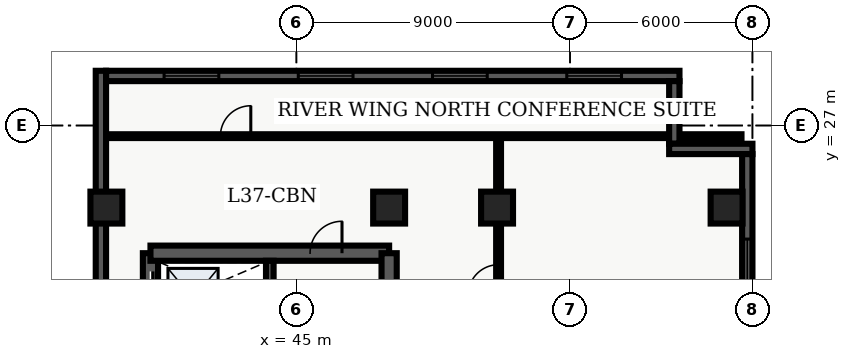
"""IFC4 building model, lengths in metres.
Left out: names, types, materials, properties, quantities, classifications, styles, units other than length and angle.
Written with IfcOpenShell. Run it as: python <this file> out.ifc"""

import sys

from ifc_helpers import new_model, entity, si_unit, converted_unit, direction, frame, origin_with_axes, origin_2d_with_axis, place, context, subcontext, project, spatial, polyline, rectangle, outline, extrude, element, fill, save


model = new_model("IFC4")
c1 = context("Model", 3, precision=1e-05, world=origin_with_axes(), true_north=direction((0.0, 1.0)))
c2 = subcontext(c1, "Body", "Model", "MODEL_VIEW")
j1 = project(units=[si_unit("LENGTHUNIT", "METRE"), converted_unit("PLANEANGLEUNIT", "DEGREE", entity("IfcPlaneAngleMeasure", 0.017), si_unit("PLANEANGLEUNIT", "RADIAN"), dimensions=[0, 0, 0, 0, 0, 0, 0])], contexts=[c1])
p1 = place(None, origin_with_axes())
s1 = spatial("IfcSite", under=j1, at=p1, CompositionType="ELEMENT")
p2 = place(p1, origin_with_axes())
s2 = spatial("IfcBuilding", under=s1, at=p2, CompositionType="ELEMENT")
p3 = place(p2, frame((0.0, 0.0, 152.4), z_axis=(0.0, 0.0, 1.0), x_axis=(1.0, 0.0, 0.0)))
s3 = spatial("IfcBuildingStorey", under=s2, at=p3, CompositionType="ELEMENT", Elevation=152.4)
p4 = place(p3, frame((40.2, 7.2, 0.0), z_axis=(0.0, 0.0, 1.0), x_axis=(0.0, 1.0, 0.0)))
e1 = element("IfcWall", 1, at=p4, inside=s3, PredefinedType="SHEAR", context=c2, shape_type="SweptSolid", body=[
    extrude(outline(polyline([(0.0, -0.25), (15.6, -0.25), (15.6, 0.25), (0.0, 0.25), (0.0, -0.25)])), origin_with_axes(), (0.0, 0.0, 1.0), 3.66),
])
p5 = place(p4, frame((14.475, 0.0, 0.0), z_axis=(0.0, 0.0, 1.0), x_axis=(1.0, 0.0, 0.0)))
e2 = element("IfcOpeningElement", 2, at=p5, cuts=e1, PredefinedType="OPENING", context=c2, shape_type="SweptSolid", body=[
    extrude(rectangle(XDim=1.05, YDim=0.52, at=origin_2d_with_axis()), origin_with_axes(), (0.0, 0.0, 1.0), 2.15),
])
p6 = place(p4, frame((12.75, 0.0, 0.0), z_axis=(0.0, 0.0, 1.0), x_axis=(1.0, 0.0, 0.0)))
e3 = element("IfcOpeningElement", 3, at=p6, cuts=e1, PredefinedType="OPENING", context=c2, shape_type="SweptSolid", body=[
    extrude(rectangle(XDim=1.2, YDim=0.52, at=origin_2d_with_axis()), origin_with_axes(), (0.0, 0.0, 1.0), 2.15),
])
p7 = place(p4, frame((9.3, 0.0, 0.0), z_axis=(0.0, 0.0, 1.0), x_axis=(1.0, 0.0, 0.0)))
e4 = element("IfcOpeningElement", 4, at=p7, cuts=e1, PredefinedType="OPENING", context=c2, shape_type="SweptSolid", body=[
    extrude(rectangle(XDim=0.9, YDim=0.52, at=origin_2d_with_axis()), origin_with_axes(), (0.0, 0.0, 1.0), 2.15),
])
p8 = place(p3, frame((40.2, 22.8, 0.0), z_axis=(0.0, 0.0, 1.0), x_axis=(1.0, 0.0, 0.0)))
e5 = element("IfcWall", 5, at=p8, inside=s3, PredefinedType="SHEAR", context=c2, shape_type="SweptSolid", body=[
    extrude(outline(polyline([(0.0, -0.25), (7.85, -0.25), (7.85, 0.25), (0.0, 0.25), (0.0, -0.25)])), origin_with_axes(), (0.0, 0.0, 1.0), 3.66),
])
p9 = place(p8, frame((5.775, 0.0, 0.0), z_axis=(0.0, 0.0, 1.0), x_axis=(1.0, 0.0, 0.0)))
e6 = element("IfcOpeningElement", 6, at=p9, cuts=e5, PredefinedType="OPENING", context=c2, shape_type="SweptSolid", body=[
    extrude(rectangle(XDim=1.05, YDim=0.52, at=origin_2d_with_axis()), origin_with_axes(), (0.0, 0.0, 1.0), 2.15),
])
p10 = place(p3, frame((48.05, 7.2, 0.0), z_axis=(0.0, 0.0, 1.0), x_axis=(0.0, 1.0, 0.0)))
e7 = element("IfcWall", 7, at=p10, inside=s3, PredefinedType="SHEAR", context=c2, shape_type="SweptSolid", body=[
    extrude(outline(polyline([(0.0, -0.25), (15.6, -0.25), (15.6, 0.25), (0.0, 0.25), (0.0, -0.25)])), origin_with_axes(), (0.0, 0.0, 1.0), 3.66),
])
p11 = place(p10, frame((5.975, 0.0, 0.0), z_axis=(0.0, 0.0, 1.0), x_axis=(1.0, 0.0, 0.0)))
e8 = element("IfcOpeningElement", 8, at=p11, cuts=e7, PredefinedType="OPENING", context=c2, shape_type="SweptSolid", body=[
    extrude(rectangle(XDim=1.05, YDim=0.52, at=origin_2d_with_axis()), origin_with_axes(), (0.0, 0.0, 1.0), 2.15),
])
p12 = place(p10, frame((2.725, 0.0, 0.0), z_axis=(0.0, 0.0, 1.0), x_axis=(1.0, 0.0, 0.0)))
e9 = element("IfcOpeningElement", 9, at=p12, cuts=e7, PredefinedType="OPENING", context=c2, shape_type="SweptSolid", body=[
    extrude(rectangle(XDim=0.95, YDim=0.52, at=origin_2d_with_axis()), origin_with_axes(), (0.0, 0.0, 1.0), 2.15),
])
p13 = place(p3, frame((44.125, 7.45, 0.0), z_axis=(0.0, 0.0, 1.0), x_axis=(0.0, 1.0, 0.0)))
e10 = element("IfcWall", 10, at=p13, inside=s3, PredefinedType="SHEAR", context=c2, shape_type="SweptSolid", body=[
    extrude(outline(polyline([(0.0, -0.125), (15.1, -0.125), (15.1, 0.125), (0.0, 0.125), (0.0, -0.125)])), origin_with_axes(), (0.0, 0.0, 1.0), 3.66),
])
for number, where, z_axis, x_axis in (
    (11, (38.75, 24.3, 0.0), (0.0, 0.0, 1.0), (1.0, 0.0, 0.0)),
    (12, (48.05, 24.3, 0.0), (0.0, 0.0, 1.0), (1.0, 0.0, 0.0)),
    (13, (51.6, 24.3, 0.0), (0.0, 0.0, 1.0), (1.0, 0.0, 0.0)),
    (14, (59.15, 24.3, 0.0), (0.0, 0.0, 1.0), (1.0, 0.0, 0.0)),
):
    element("IfcColumn", number, at=place(p3, frame(where, z_axis=z_axis, x_axis=x_axis)), inside=s3, PredefinedType="COLUMN", context=c2, shape_type="SweptSolid", body=[
        extrude(rectangle(XDim=1.05, YDim=1.05, at=origin_2d_with_axis()), origin_with_axes(), (0.0, 0.0, 1.0), 3.9),
    ])
p14 = place(p3, frame((51.65, 7.85, 0.0), z_axis=(0.0, 0.0, 1.0), x_axis=(0.0, 1.0, 0.0)))
e15 = element("IfcWall", 15, at=p14, inside=s3, PredefinedType="PARTITIONING", context=c2, shape_type="SweptSolid", body=[
    extrude(outline(polyline([(0.0, -0.08), (18.8, -0.08), (18.8, 0.08), (0.0, 0.08), (0.0, -0.08)])), origin_with_axes(), (0.0, 0.0, 1.0), 2.7),
])
p15 = place(p14, frame((4.222, 0.0, 0.0), z_axis=(0.0, 0.0, 1.0), x_axis=(1.0, 0.0, 0.0)))
e16 = element("IfcOpeningElement", 16, at=p15, cuts=e15, PredefinedType="OPENING", context=c2, shape_type="SweptSolid", body=[
    extrude(rectangle(XDim=1.0, YDim=0.18, at=origin_2d_with_axis()), origin_with_axes(), (0.0, 0.0, 1.0), 2.15),
])
p16 = place(p14, frame((7.845, 0.0, 0.0), z_axis=(0.0, 0.0, 1.0), x_axis=(1.0, 0.0, 0.0)))
e17 = element("IfcOpeningElement", 17, at=p16, cuts=e15, PredefinedType="OPENING", context=c2, shape_type="SweptSolid", body=[
    extrude(rectangle(XDim=1.0, YDim=0.18, at=origin_2d_with_axis()), origin_with_axes(), (0.0, 0.0, 1.0), 2.15),
])
p17 = place(p14, frame((14.072, 0.0, 0.0), z_axis=(0.0, 0.0, 1.0), x_axis=(1.0, 0.0, 0.0)))
e18 = element("IfcOpeningElement", 18, at=p17, cuts=e15, PredefinedType="OPENING", context=c2, shape_type="SweptSolid", body=[
    extrude(rectangle(XDim=1.0, YDim=0.18, at=origin_2d_with_axis()), origin_with_axes(), (0.0, 0.0, 1.0), 2.15),
])
p18 = place(p3, frame((38.735, 26.65, 0.0), z_axis=(0.0, 0.0, 1.0), x_axis=(1.0, 0.0, 0.0)))
e19 = element("IfcWall", 19, at=p18, inside=s3, PredefinedType="PARTITIONING", context=c2, shape_type="SweptSolid", body=[
    extrude(outline(polyline([(0.0, -0.062), (20.905, -0.062), (20.905, 0.062), (0.0, 0.062), (0.0, -0.062)])), origin_with_axes(), (0.0, 0.0, 1.0), 2.7),
])
p19 = place(p18, frame((4.265, 0.0, 0.0), z_axis=(0.0, 0.0, 1.0), x_axis=(1.0, 0.0, 0.0)))
e20 = element("IfcOpeningElement", 20, at=p19, cuts=e19, PredefinedType="OPENING", context=c2, shape_type="SweptSolid", body=[
    extrude(rectangle(XDim=1.0, YDim=0.145, at=origin_2d_with_axis()), origin_with_axes(), (0.0, 0.0, 1.0), 2.15),
])
p20 = place(p3, frame((38.57, 21.26, 0.0), z_axis=(0.0, 0.0, 1.0), x_axis=(0.0, 1.0, 0.0)))
e21 = element("IfcWall", 21, at=p20, inside=s3, PredefinedType="SOLIDWALL", context=c2, shape_type="SweptSolid", body=[
    extrude(outline(polyline([(0.0, -0.17), (7.54, -0.17), (7.54, 0.17), (0.0, 0.17), (0.0, -0.17)])), origin_with_axes(), (0.0, 0.0, 1.0), 3.66),
])
p21 = place(p3, frame((38.74, 28.63, 0.0), z_axis=(0.0, 0.0, 1.0), x_axis=(1.0, 0.0, 0.0)))
e22 = element("IfcWall", 22, at=p21, inside=s3, PredefinedType="SOLIDWALL", context=c2, shape_type="SweptSolid", body=[
    extrude(outline(polyline([(0.0, -0.17), (18.86, -0.17), (18.86, 0.17), (0.0, 0.17), (0.0, -0.17)])), origin_with_axes(), (0.0, 0.0, 1.0), 3.66),
])
p22 = place(p21, frame((2.808, 0.0, 0.45), z_axis=(0.0, 0.0, 1.0), x_axis=(1.0, 0.0, 0.0)))
e23 = element("IfcOpeningElement", 23, at=p22, cuts=e22, PredefinedType="OPENING", context=c2, shape_type="SweptSolid", body=[
    extrude(rectangle(XDim=1.8, YDim=0.36, at=origin_2d_with_axis()), origin_with_axes(), (0.0, 0.0, 1.0), 2.1),
])
p23 = place(p21, frame((7.222, 0.0, 0.45), z_axis=(0.0, 0.0, 1.0), x_axis=(1.0, 0.0, 0.0)))
e24 = element("IfcOpeningElement", 24, at=p23, cuts=e22, PredefinedType="OPENING", context=c2, shape_type="SweptSolid", body=[
    extrude(rectangle(XDim=1.8, YDim=0.36, at=origin_2d_with_axis()), origin_with_axes(), (0.0, 0.0, 1.0), 2.1),
])
p24 = place(p21, frame((11.637, 0.0, 0.45), z_axis=(0.0, 0.0, 1.0), x_axis=(1.0, 0.0, 0.0)))
e25 = element("IfcOpeningElement", 25, at=p24, cuts=e22, PredefinedType="OPENING", context=c2, shape_type="SweptSolid", body=[
    extrude(rectangle(XDim=1.8, YDim=0.36, at=origin_2d_with_axis()), origin_with_axes(), (0.0, 0.0, 1.0), 2.1),
])
p25 = place(p21, frame((16.053, 0.0, 0.45), z_axis=(0.0, 0.0, 1.0), x_axis=(1.0, 0.0, 0.0)))
e26 = element("IfcOpeningElement", 26, at=p25, cuts=e22, PredefinedType="OPENING", context=c2, shape_type="SweptSolid", body=[
    extrude(rectangle(XDim=1.8, YDim=0.36, at=origin_2d_with_axis()), origin_with_axes(), (0.0, 0.0, 1.0), 2.1),
])
p26 = place(p3, frame((57.43, 28.46, 0.0), z_axis=(0.0, 0.0, 1.0), x_axis=(0.0, -1.0, 0.0)))
e27 = element("IfcWall", 27, at=p26, inside=s3, PredefinedType="SOLIDWALL", context=c2, shape_type="SweptSolid", body=[
    extrude(outline(polyline([(0.0, -0.17), (2.06, -0.17), (2.06, 0.17), (0.0, 0.17), (0.0, -0.17)])), origin_with_axes(), (0.0, 0.0, 1.0), 3.66),
])
p27 = place(p3, frame((57.26, 26.23, 0.0), z_axis=(0.0, 0.0, 1.0), x_axis=(1.0, 0.0, 0.0)))
e28 = element("IfcWall", 28, at=p27, inside=s3, PredefinedType="SOLIDWALL", context=c2, shape_type="SweptSolid", body=[
    extrude(outline(polyline([(0.0, -0.17), (2.74, -0.17), (2.74, 0.17), (0.0, 0.17), (0.0, -0.17)])), origin_with_axes(), (0.0, 0.0, 1.0), 3.66),
])
p28 = place(p3, frame((59.83, 26.06, 0.0), z_axis=(0.0, 0.0, 1.0), x_axis=(0.0, -1.0, 0.0)))
e29 = element("IfcWall", 29, at=p28, inside=s3, PredefinedType="SOLIDWALL", context=c2, shape_type="SweptSolid", body=[
    extrude(outline(polyline([(0.0, -0.17), (23.66, -0.17), (23.66, 0.17), (0.0, 0.17), (0.0, -0.17)])), origin_with_axes(), (0.0, 0.0, 1.0), 3.66),
])
p29 = place(p28, frame((3.696, 0.0, 0.45), z_axis=(0.0, 0.0, 1.0), x_axis=(1.0, 0.0, 0.0)))
e30 = element("IfcOpeningElement", 30, at=p29, cuts=e29, PredefinedType="OPENING", context=c2, shape_type="SweptSolid", body=[
    extrude(rectangle(XDim=1.8, YDim=0.36, at=origin_2d_with_axis()), origin_with_axes(), (0.0, 0.0, 1.0), 2.1),
])
p30 = place(p28, frame((11.38, 0.0, 0.45), z_axis=(0.0, 0.0, 1.0), x_axis=(1.0, 0.0, 0.0)))
e31 = element("IfcOpeningElement", 31, at=p30, cuts=e29, PredefinedType="OPENING", context=c2, shape_type="SweptSolid", body=[
    extrude(rectangle(XDim=1.8, YDim=0.36, at=origin_2d_with_axis()), origin_with_axes(), (0.0, 0.0, 1.0), 2.1),
])
p31 = place(p28, frame((20.364, 0.0, 0.45), z_axis=(0.0, 0.0, 1.0), x_axis=(1.0, 0.0, 0.0)))
e32 = element("IfcOpeningElement", 32, at=p31, cuts=e29, PredefinedType="OPENING", context=c2, shape_type="SweptSolid", body=[
    extrude(rectangle(XDim=1.8, YDim=0.36, at=origin_2d_with_axis()), origin_with_axes(), (0.0, 0.0, 1.0), 2.1),
])
p32 = place(p4, frame((14.475, 0.0, 0.0), z_axis=(0.0, 0.0, 1.0), x_axis=(1.0, 0.0, 0.0)))
e33 = element("IfcDoor", 33, at=p32, inside=s3, OperationType="SLIDING_TO_RIGHT", PredefinedType="DOOR", context=c2, shape_type="SweptSolid", body=[
    extrude(rectangle(XDim=1.05, YDim=0.09, at=origin_2d_with_axis()), origin_with_axes(), (0.0, 0.0, 1.0), 2.15),
])
fill(e2, e33)
p33 = place(p8, frame((5.775, 0.0, 0.0), z_axis=(0.0, 0.0, 1.0), x_axis=(1.0, 0.0, 0.0)))
e34 = element("IfcDoor", 34, at=p33, inside=s3, OperationType="SINGLE_SWING_RIGHT", PredefinedType="DOOR", context=c2, shape_type="SweptSolid", body=[
    extrude(rectangle(XDim=1.05, YDim=0.09, at=origin_2d_with_axis()), origin_with_axes(), (0.0, 0.0, 1.0), 2.15),
])
fill(e6, e34)
p34 = place(p18, frame((4.265, 0.0, 0.0), z_axis=(0.0, 0.0, 1.0), x_axis=(1.0, 0.0, 0.0)))
e35 = element("IfcDoor", 35, at=p34, inside=s3, OperationType="SINGLE_SWING_RIGHT", PredefinedType="DOOR", context=c2, shape_type="SweptSolid", body=[
    extrude(rectangle(XDim=1.0, YDim=0.075, at=origin_2d_with_axis()), origin_with_axes(), (0.0, 0.0, 1.0), 2.15),
])
fill(e20, e35)
p35 = place(p14, frame((14.072, 0.0, 0.0), z_axis=(0.0, 0.0, 1.0), x_axis=(1.0, 0.0, 0.0)))
e36 = element("IfcDoor", 36, at=p35, inside=s3, OperationType="SINGLE_SWING_LEFT", PredefinedType="DOOR", context=c2, shape_type="SweptSolid", body=[
    extrude(rectangle(XDim=1.0, YDim=0.09, at=origin_2d_with_axis()), origin_with_axes(), (0.0, 0.0, 1.0), 2.15),
])
fill(e18, e36)
p36 = place(p21, frame((2.808, 0.0, 0.45), z_axis=(0.0, 0.0, 1.0), x_axis=(1.0, 0.0, 0.0)))
e37 = element("IfcWindow", 37, at=p36, inside=s3, PredefinedType="WINDOW", context=c2, shape_type="SweptSolid", body=[
    extrude(rectangle(XDim=1.8, YDim=0.09, at=origin_2d_with_axis()), origin_with_axes(), (0.0, 0.0, 1.0), 2.1),
])
fill(e23, e37)
p37 = place(p21, frame((7.222, 0.0, 0.45), z_axis=(0.0, 0.0, 1.0), x_axis=(1.0, 0.0, 0.0)))
e38 = element("IfcWindow", 38, at=p37, inside=s3, PredefinedType="WINDOW", context=c2, shape_type="SweptSolid", body=[
    extrude(rectangle(XDim=1.8, YDim=0.09, at=origin_2d_with_axis()), origin_with_axes(), (0.0, 0.0, 1.0), 2.1),
])
fill(e24, e38)
p38 = place(p21, frame((11.637, 0.0, 0.45), z_axis=(0.0, 0.0, 1.0), x_axis=(1.0, 0.0, 0.0)))
e39 = element("IfcWindow", 39, at=p38, inside=s3, PredefinedType="WINDOW", context=c2, shape_type="SweptSolid", body=[
    extrude(rectangle(XDim=1.8, YDim=0.09, at=origin_2d_with_axis()), origin_with_axes(), (0.0, 0.0, 1.0), 2.1),
])
fill(e25, e39)
p39 = place(p21, frame((16.053, 0.0, 0.45), z_axis=(0.0, 0.0, 1.0), x_axis=(1.0, 0.0, 0.0)))
e40 = element("IfcWindow", 40, at=p39, inside=s3, PredefinedType="WINDOW", context=c2, shape_type="SweptSolid", body=[
    extrude(rectangle(XDim=1.8, YDim=0.09, at=origin_2d_with_axis()), origin_with_axes(), (0.0, 0.0, 1.0), 2.1),
])
fill(e26, e40)
p40 = place(p28, frame((3.696, 0.0, 0.45), z_axis=(0.0, 0.0, 1.0), x_axis=(1.0, 0.0, 0.0)))
e41 = element("IfcWindow", 41, at=p40, inside=s3, PredefinedType="WINDOW", context=c2, shape_type="SweptSolid", body=[
    extrude(rectangle(XDim=1.8, YDim=0.09, at=origin_2d_with_axis()), origin_with_axes(), (0.0, 0.0, 1.0), 2.1),
])
fill(e30, e41)
save(model, sys.argv[1])
